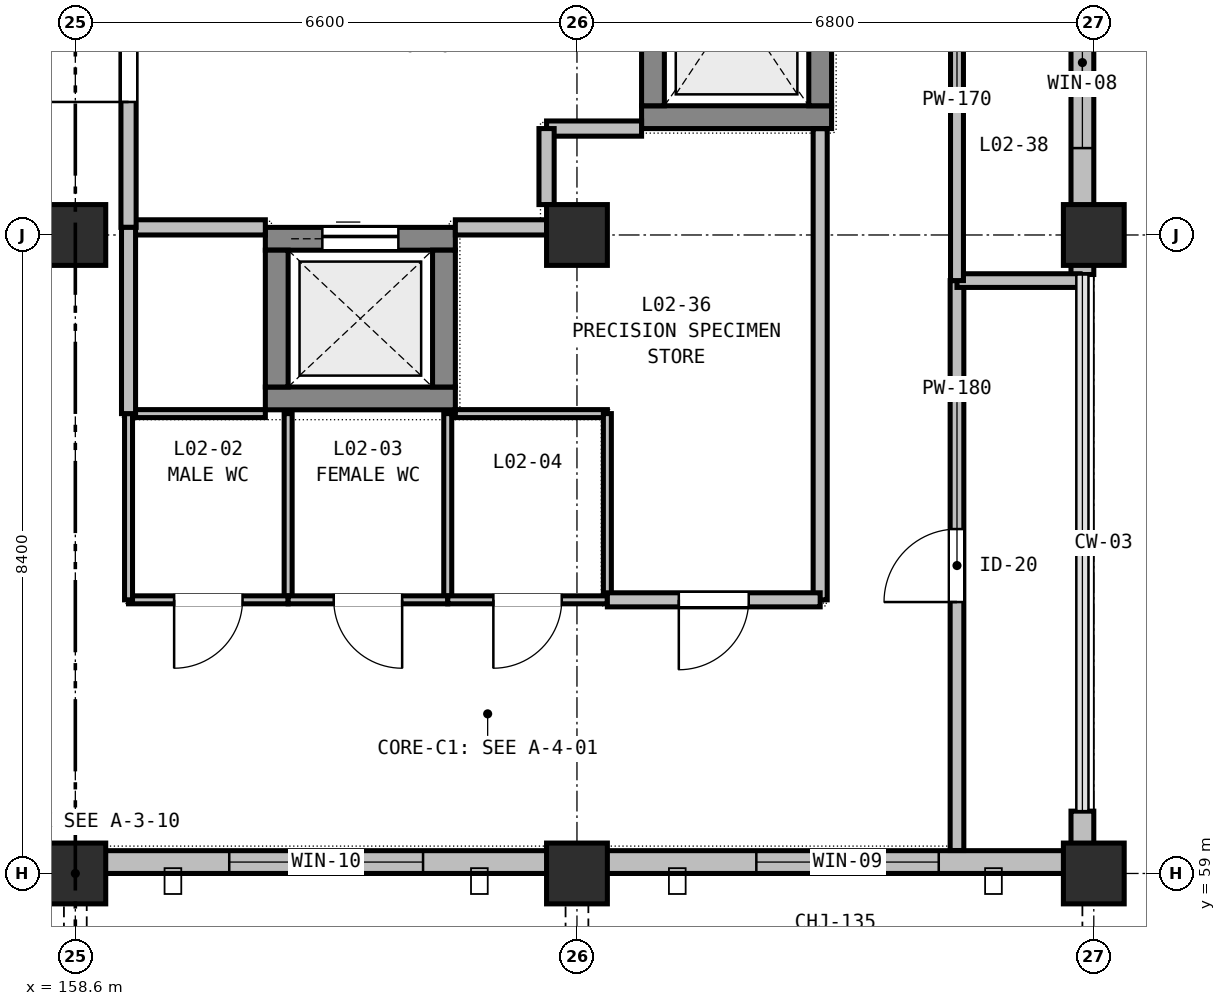
"""IFC4 building model, lengths in metres.
Left out: names, types, materials, properties, quantities, classifications, styles, units other than length and angle.
Written with IfcOpenShell. Run it as: python <this file> out.ifc"""

import sys

from ifc_helpers import new_model, si_unit, direction, frame, frame_2d, origin, origin_2d, place, context, subcontext, project, spatial, rectangle, extrude, element, fill, save


model = new_model("IFC4")
c1 = context("Model", 3, precision=1e-05, world=origin(), true_north=direction((0.0, 1.0)))
c2 = subcontext(c1, "Body", "Model", "MODEL_VIEW")
j1 = project(units=[si_unit("LENGTHUNIT", "METRE"), si_unit("PLANEANGLEUNIT", "RADIAN")], contexts=[c1])
p1 = place(None, origin())
s1 = spatial("IfcSite", under=j1, at=p1, CompositionType="ELEMENT")
p2 = place(p1, origin())
s2 = spatial("IfcBuilding", under=s1, at=p2, CompositionType="ELEMENT")
p3 = place(p2, frame((0.0, 0.0, 10.2)))
s3 = spatial("IfcBuildingStorey", under=s2, at=p3, CompositionType="ELEMENT", Elevation=10.2)
for number, where, z_axis, x_axis in (
    (1, (158.6, 59.0, 0.0), (0.0, 0.0, 1.0), (1.0, 0.0, 0.0)),
    (2, (158.6, 67.4, 0.0), (0.0, 0.0, 1.0), (1.0, 0.0, 0.0)),
    (3, (165.2, 59.0, 0.0), (0.0, 0.0, 1.0), (1.0, 0.0, 0.0)),
    (4, (165.2, 67.4, 0.0), (0.0, 0.0, 1.0), (1.0, 0.0, 0.0)),
    (5, (172.0, 59.0, 0.0), (0.0, 0.0, 1.0), (1.0, 0.0, 0.0)),
    (6, (172.0, 67.4, 0.0), (0.0, 0.0, 1.0), (1.0, 0.0, 0.0)),
):
    element("IfcColumn", number, at=place(p3, frame(where, z_axis=z_axis, x_axis=x_axis)), inside=s3, PredefinedType="COLUMN", context=c2, shape_type="SweptSolid", body=[
        extrude(rectangle(XDim=0.8, YDim=0.8, at=origin_2d()), origin(), (0.0, 0.0, 1.0), 4.8),
    ])
p4 = place(p3, frame((166.05, 68.95, 0.0), z_axis=(0.0, 0.0, 1.0), x_axis=(1.0, 0.0, 0.0)))
e7 = element("IfcWall", 7, at=p4, inside=s3, PredefinedType="SHEAR", context=c2, shape_type="SweptSolid", body=[
    extrude(rectangle(XDim=2.5, YDim=0.3, at=frame_2d((1.25, 0.0))), origin(), (0.0, 0.0, 1.0), 4.8),
])
p5 = place(p3, frame((166.2, 69.1, 0.0), z_axis=(0.0, 0.0, 1.0), x_axis=(0.0, 1.0, 0.0)))
e8 = element("IfcWall", 8, at=p5, inside=s3, PredefinedType="SHEAR", context=c2, shape_type="SweptSolid", body=[
    extrude(rectangle(XDim=2.7, YDim=0.3, at=frame_2d((1.35, 0.0))), origin(), (0.0, 0.0, 1.0), 4.8),
])
p6 = place(p5, frame((0.8, 0.0, 0.0)))
e9 = element("IfcOpeningElement", 9, at=p6, cuts=e8, PredefinedType="OPENING", context=c2, shape_type="SweptSolid", body=[
    extrude(rectangle(XDim=1.1, YDim=2.1, at=frame_2d((0.55, 1.05))), frame((0.0, 0.16, 0.0), z_axis=(0.0, -1.0, 0.0), x_axis=(1.0, 0.0, 0.0)), (0.0, 0.0, 1.0), 0.32),
])
p7 = place(p3, frame((168.4, 69.1, 0.0), z_axis=(0.0, 0.0, 1.0), x_axis=(0.0, 1.0, 0.0)))
e10 = element("IfcWall", 10, at=p7, inside=s3, PredefinedType="SHEAR", context=c2, shape_type="SweptSolid", body=[
    extrude(rectangle(XDim=2.7, YDim=0.3, at=frame_2d((1.35, 0.0))), origin(), (0.0, 0.0, 1.0), 4.8),
])
p8 = place(p3, frame((161.1, 65.25, 0.0), z_axis=(0.0, 0.0, 1.0), x_axis=(1.0, 0.0, 0.0)))
e11 = element("IfcWall", 11, at=p8, inside=s3, PredefinedType="SHEAR", context=c2, shape_type="SweptSolid", body=[
    extrude(rectangle(XDim=2.5, YDim=0.3, at=frame_2d((1.25, 0.0))), origin(), (0.0, 0.0, 1.0), 4.8),
])
p9 = place(p3, frame((161.1, 67.35, 0.0), z_axis=(0.0, 0.0, 1.0), x_axis=(1.0, 0.0, 0.0)))
e12 = element("IfcWall", 12, at=p9, inside=s3, PredefinedType="SHEAR", context=c2, shape_type="SweptSolid", body=[
    extrude(rectangle(XDim=2.5, YDim=0.3, at=frame_2d((1.25, 0.0))), origin(), (0.0, 0.0, 1.0), 4.8),
])
p10 = place(p9, frame((0.75, 0.0, 0.0)))
e13 = element("IfcOpeningElement", 13, at=p10, cuts=e12, PredefinedType="OPENING", context=c2, shape_type="SweptSolid", body=[
    extrude(rectangle(XDim=1.0, YDim=2.1, at=frame_2d((0.5, 1.05))), frame((0.0, 0.16, 0.0), z_axis=(0.0, -1.0, 0.0), x_axis=(1.0, 0.0, 0.0)), (0.0, 0.0, 1.0), 0.32),
])
for number, where, z_axis, x_axis in (
    (14, (161.25, 65.4, 0.0), (0.0, 0.0, 1.0), (0.0, 1.0, 0.0)),
    (15, (163.45, 65.4, 0.0), (0.0, 0.0, 1.0), (0.0, 1.0, 0.0)),
):
    element("IfcWall", number, at=place(p3, frame(where, z_axis=z_axis, x_axis=x_axis)), inside=s3, PredefinedType="SHEAR", context=c2, shape_type="SweptSolid", body=[
        extrude(rectangle(XDim=1.8, YDim=0.3, at=frame_2d((0.9, 0.0))), origin(), (0.0, 0.0, 1.0), 4.8),
    ])
p11 = place(p3, frame((171.85, 75.8, 0.0), z_axis=(0.0, 0.0, 1.0), x_axis=(0.0, -1.0, 0.0)))
e16 = element("IfcWall", 16, at=p11, inside=s3, PredefinedType="STANDARD", context=c2, shape_type="SweptSolid", body=[
    extrude(rectangle(XDim=8.4, YDim=0.3, at=frame_2d((4.2, 0.0))), origin(), (0.0, 0.0, 1.0), 4.085),
])
p12 = place(p11, frame((1.143, 0.0, 0.9)))
e17 = element("IfcOpeningElement", 17, at=p12, cuts=e16, PredefinedType="OPENING", context=c2, shape_type="SweptSolid", body=[
    extrude(rectangle(XDim=2.25, YDim=2.1, at=frame_2d((1.125, 1.05))), frame((0.0, 0.16, 0.0), z_axis=(0.0, -1.0, 0.0), x_axis=(1.0, 0.0, 0.0)), (0.0, 0.0, 1.0), 0.32),
])
p13 = place(p11, frame((5.007, 0.0, 0.9)))
e18 = element("IfcOpeningElement", 18, at=p13, cuts=e16, PredefinedType="OPENING", context=c2, shape_type="SweptSolid", body=[
    extrude(rectangle(XDim=2.25, YDim=2.1, at=frame_2d((1.125, 1.05))), frame((0.0, 0.16, 0.0), z_axis=(0.0, -1.0, 0.0), x_axis=(1.0, 0.0, 0.0)), (0.0, 0.0, 1.0), 0.32),
])
for number, where, z_axis, x_axis in (
    (19, (171.85, 67.4, 0.0), (0.0, 0.0, 1.0), (0.0, -1.0, 0.0)),
    (20, (171.85, 59.82, 0.0), (0.0, 0.0, 1.0), (0.0, -1.0, 0.0)),
):
    element("IfcWall", number, at=place(p3, frame(where, z_axis=z_axis, x_axis=x_axis)), inside=s3, PredefinedType="STANDARD", context=c2, shape_type="SweptSolid", body=[
        extrude(rectangle(XDim=0.52, YDim=0.3, at=frame_2d((0.26, 0.0))), origin(), (0.0, 0.0, 1.0), 4.085),
    ])
p14 = place(p3, frame((172.0, 59.15, 0.0), z_axis=(0.0, 0.0, 1.0), x_axis=(-1.0, 0.0, 0.0)))
e21 = element("IfcWall", 21, at=p14, inside=s3, PredefinedType="STANDARD", context=c2, shape_type="SweptSolid", body=[
    extrude(rectangle(XDim=6.8, YDim=0.3, at=frame_2d((3.4, 0.0))), origin(), (0.0, 0.0, 1.0), 3.935),
])
p15 = place(p14, frame((2.04, 0.0, 0.9)))
e22 = element("IfcOpeningElement", 22, at=p15, cuts=e21, PredefinedType="OPENING", context=c2, shape_type="SweptSolid", body=[
    extrude(rectangle(XDim=2.4, YDim=2.1, at=frame_2d((1.2, 1.05))), frame((0.0, 0.16, 0.0), z_axis=(0.0, -1.0, 0.0), x_axis=(1.0, 0.0, 0.0)), (0.0, 0.0, 1.0), 0.32),
])
p16 = place(p3, frame((165.2, 59.15, 0.0), z_axis=(0.0, 0.0, 1.0), x_axis=(-1.0, 0.0, 0.0)))
e23 = element("IfcWall", 23, at=p16, inside=s3, PredefinedType="STANDARD", context=c2, shape_type="SweptSolid", body=[
    extrude(rectangle(XDim=6.6, YDim=0.3, at=frame_2d((3.3, 0.0))), origin(), (0.0, 0.0, 1.0), 3.935),
])
p17 = place(p16, frame((2.025, 0.0, 0.75)))
e24 = element("IfcOpeningElement", 24, at=p17, cuts=e23, PredefinedType="OPENING", context=c2, shape_type="SweptSolid", body=[
    extrude(rectangle(XDim=2.55, YDim=2.15, at=frame_2d((1.275, 1.075))), frame((0.0, 0.16, 0.0), z_axis=(0.0, -1.0, 0.0), x_axis=(1.0, 0.0, 0.0)), (0.0, 0.0, 1.0), 0.32),
])
p18 = place(p3, frame((158.6, 59.15, 0.0), z_axis=(0.0, 0.0, 1.0), x_axis=(-1.0, 0.0, 0.0)))
e25 = element("IfcWall", 25, at=p18, inside=s3, PredefinedType="STANDARD", context=c2, shape_type="SweptSolid", body=[
    extrude(rectangle(XDim=6.6, YDim=0.3, at=frame_2d((3.3, 0.0))), origin(), (0.0, 0.0, 1.0), 3.935),
])
p19 = place(p18, frame((1.95, 0.0, 0.75)))
e26 = element("IfcOpeningElement", 26, at=p19, cuts=e25, PredefinedType="OPENING", context=c2, shape_type="SweptSolid", body=[
    extrude(rectangle(XDim=2.7, YDim=2.2, at=frame_2d((1.35, 1.1))), frame((0.0, 0.16, 0.0), z_axis=(0.0, -1.0, 0.0), x_axis=(1.0, 0.0, 0.0)), (0.0, 0.0, 1.0), 0.32),
])
p20 = place(p3, frame((166.05, 68.8, 0.0), z_axis=(0.0, 0.0, 1.0), x_axis=(-1.0, 0.0, 0.0)))
e27 = element("IfcWall", 27, at=p20, inside=s3, PredefinedType="PARTITIONING", context=c2, shape_type="SweptSolid", body=[
    extrude(rectangle(XDim=1.25, YDim=0.2, at=frame_2d((0.625, 0.0))), origin(), (0.0, 0.0, 1.0), 3.935),
])
p21 = place(p3, frame((164.8, 68.8, 0.0), z_axis=(0.0, 0.0, 1.0), x_axis=(0.0, -1.0, 0.0)))
e28 = element("IfcWall", 28, at=p21, inside=s3, PredefinedType="PARTITIONING", context=c2, shape_type="SweptSolid", body=[
    extrude(rectangle(XDim=1.0, YDim=0.2, at=frame_2d((0.5, 0.0))), origin(), (0.0, 0.0, 1.0), 4.495),
])
p22 = place(p3, frame((164.8, 67.5, 0.0), z_axis=(0.0, 0.0, 1.0), x_axis=(-1.0, 0.0, 0.0)))
e29 = element("IfcWall", 29, at=p22, inside=s3, PredefinedType="PARTITIONING", context=c2, shape_type="SweptSolid", body=[
    extrude(rectangle(XDim=1.2, YDim=0.2, at=frame_2d((0.6, 0.0))), origin(), (0.0, 0.0, 1.0), 4.135),
])
p23 = place(p3, frame((161.1, 67.5, 0.0), z_axis=(0.0, 0.0, 1.0), x_axis=(-1.0, 0.0, 0.0)))
e30 = element("IfcWall", 30, at=p23, inside=s3, PredefinedType="PARTITIONING", context=c2, shape_type="SweptSolid", body=[
    extrude(rectangle(XDim=1.8, YDim=0.2, at=frame_2d((0.9, 0.0))), origin(), (0.0, 0.0, 1.0), 4.135),
])
p24 = place(p3, frame((159.3, 67.5, 0.0), z_axis=(0.0, 0.0, 1.0), x_axis=(0.0, 1.0, 0.0)))
e31 = element("IfcWall", 31, at=p24, inside=s3, PredefinedType="PARTITIONING", context=c2, shape_type="SweptSolid", body=[
    extrude(rectangle(XDim=4.55, YDim=0.2, at=frame_2d((2.275, 0.0))), origin(), (0.0, 0.0, 1.0), 4.135),
])
p25 = place(p24, frame((1.65, 0.0, 0.0)))
e32 = element("IfcOpeningElement", 32, at=p25, cuts=e31, PredefinedType="OPENING", context=c2, shape_type="SweptSolid", body=[
    extrude(rectangle(XDim=1.25, YDim=2.15, at=frame_2d((0.625, 1.075))), frame((0.0, 0.11, 0.0), z_axis=(0.0, -1.0, 0.0), x_axis=(1.0, 0.0, 0.0)), (0.0, 0.0, 1.0), 0.22),
])
p26 = place(p3, frame((159.3, 65.05, 0.0), z_axis=(0.0, 0.0, 1.0), x_axis=(1.0, 0.0, 0.0)))
e33 = element("IfcWall", 33, at=p26, inside=s3, PredefinedType="PARTITIONING", context=c2, shape_type="SweptSolid", body=[
    extrude(rectangle(XDim=1.8, YDim=0.105, at=frame_2d((0.9, 0.0))), origin(), (0.0, 0.0, 1.0), 4.495),
])
p27 = place(p3, frame((161.4, 65.05, 0.0), z_axis=(0.0, 0.0, 1.0), x_axis=(0.0, -1.0, 0.0)))
e34 = element("IfcWall", 34, at=p27, inside=s3, PredefinedType="PARTITIONING", context=c2, shape_type="SweptSolid", body=[
    extrude(rectangle(XDim=2.45, YDim=0.105, at=frame_2d((1.225, 0.0))), origin(), (0.0, 0.0, 1.0), 4.495),
])
p28 = place(p3, frame((161.4, 62.6, 0.0), z_axis=(0.0, 0.0, 1.0), x_axis=(-1.0, 0.0, 0.0)))
e35 = element("IfcWall", 35, at=p28, inside=s3, PredefinedType="PARTITIONING", context=c2, shape_type="SweptSolid", body=[
    extrude(rectangle(XDim=2.1, YDim=0.105, at=frame_2d((1.05, 0.0))), origin(), (0.0, 0.0, 1.0), 4.495),
])
p29 = place(p28, frame((0.6, 0.0, 0.0)))
e36 = element("IfcOpeningElement", 36, at=p29, cuts=e35, PredefinedType="OPENING", context=c2, shape_type="SweptSolid", body=[
    extrude(rectangle(XDim=0.9, YDim=2.02, at=frame_2d((0.45, 1.01))), frame((0.0, 0.062, 0.0), z_axis=(0.0, -1.0, 0.0), x_axis=(1.0, 0.0, 0.0)), (0.0, 0.0, 1.0), 0.125),
])
for number, where, z_axis, x_axis in (
    (37, (159.3, 62.6, 0.0), (0.0, 0.0, 1.0), (0.0, 1.0, 0.0)),
    (38, (163.5, 65.05, 0.0), (0.0, 0.0, 1.0), (0.0, -1.0, 0.0)),
):
    element("IfcWall", number, at=place(p3, frame(where, z_axis=z_axis, x_axis=x_axis)), inside=s3, PredefinedType="PARTITIONING", context=c2, shape_type="SweptSolid", body=[
        extrude(rectangle(XDim=2.45, YDim=0.105, at=frame_2d((1.225, 0.0))), origin(), (0.0, 0.0, 1.0), 4.495),
    ])
p30 = place(p3, frame((163.5, 62.6, 0.0), z_axis=(0.0, 0.0, 1.0), x_axis=(-1.0, 0.0, 0.0)))
e39 = element("IfcWall", 39, at=p30, inside=s3, PredefinedType="PARTITIONING", context=c2, shape_type="SweptSolid", body=[
    extrude(rectangle(XDim=2.1, YDim=0.105, at=frame_2d((1.05, 0.0))), origin(), (0.0, 0.0, 1.0), 4.495),
])
p31 = place(p30, frame((0.6, 0.0, 0.0)))
e40 = element("IfcOpeningElement", 40, at=p31, cuts=e39, PredefinedType="OPENING", context=c2, shape_type="SweptSolid", body=[
    extrude(rectangle(XDim=0.9, YDim=2.02, at=frame_2d((0.45, 1.01))), frame((0.0, 0.062, 0.0), z_axis=(0.0, -1.0, 0.0), x_axis=(1.0, 0.0, 0.0)), (0.0, 0.0, 1.0), 0.125),
])
p32 = place(p3, frame((163.6, 65.05, 0.0), z_axis=(0.0, 0.0, 1.0), x_axis=(1.0, 0.0, 0.0)))
e41 = element("IfcWall", 41, at=p32, inside=s3, PredefinedType="PARTITIONING", context=c2, shape_type="SweptSolid", body=[
    extrude(rectangle(XDim=2.0, YDim=0.105, at=frame_2d((1.0, 0.0))), origin(), (0.0, 0.0, 1.0), 3.935),
])
p33 = place(p3, frame((165.6, 65.05, 0.0), z_axis=(0.0, 0.0, 1.0), x_axis=(0.0, -1.0, 0.0)))
e42 = element("IfcWall", 42, at=p33, inside=s3, PredefinedType="PARTITIONING", context=c2, shape_type="SweptSolid", body=[
    extrude(rectangle(XDim=2.45, YDim=0.105, at=frame_2d((1.225, 0.0))), origin(), (0.0, 0.0, 1.0), 4.495),
])
p34 = place(p3, frame((165.6, 62.6, 0.0), z_axis=(0.0, 0.0, 1.0), x_axis=(-1.0, 0.0, 0.0)))
e43 = element("IfcWall", 43, at=p34, inside=s3, PredefinedType="PARTITIONING", context=c2, shape_type="SweptSolid", body=[
    extrude(rectangle(XDim=2.1, YDim=0.105, at=frame_2d((1.05, 0.0))), origin(), (0.0, 0.0, 1.0), 3.935),
])
p35 = place(p34, frame((0.6, 0.0, 0.0)))
e44 = element("IfcOpeningElement", 44, at=p35, cuts=e43, PredefinedType="OPENING", context=c2, shape_type="SweptSolid", body=[
    extrude(rectangle(XDim=0.9, YDim=2.02, at=frame_2d((0.45, 1.01))), frame((0.0, 0.062, 0.0), z_axis=(0.0, -1.0, 0.0), x_axis=(1.0, 0.0, 0.0)), (0.0, 0.0, 1.0), 0.125),
])
p36 = place(p3, frame((168.4, 68.798, 0.0), z_axis=(0.0, 0.0, 1.0), x_axis=(0.0, -1.0, 0.0)))
e45 = element("IfcWall", 45, at=p36, inside=s3, PredefinedType="PARTITIONING", context=c2, shape_type="SweptSolid", body=[
    extrude(rectangle(XDim=6.198, YDim=0.185, at=frame_2d((3.099, 0.0))), origin(), (0.0, 0.0, 1.0), 4.135),
])
p37 = place(p3, frame((168.4, 62.6, 0.0), z_axis=(0.0, 0.0, 1.0), x_axis=(-1.0, 0.0, 0.0)))
e46 = element("IfcWall", 46, at=p37, inside=s3, PredefinedType="PARTITIONING", context=c2, shape_type="SweptSolid", body=[
    extrude(rectangle(XDim=2.8, YDim=0.185, at=frame_2d((1.4, 0.0))), origin(), (0.0, 0.0, 1.0), 4.285),
])
p38 = place(p37, frame((0.94, 0.0, 0.0)))
e47 = element("IfcOpeningElement", 47, at=p38, cuts=e46, PredefinedType="OPENING", context=c2, shape_type="SweptSolid", body=[
    extrude(rectangle(XDim=0.92, YDim=2.14, at=frame_2d((0.46, 1.07))), frame((0.0, 0.103, 0.0), z_axis=(0.0, -1.0, 0.0), x_axis=(1.0, 0.0, 0.0)), (0.0, 0.0, 1.0), 0.205),
])
p39 = place(p3, frame((159.3, 65.05, 0.0), z_axis=(0.0, 0.0, 1.0), x_axis=(0.0, 1.0, 0.0)))
e48 = element("IfcWall", 48, at=p39, inside=s3, PredefinedType="PARTITIONING", context=c2, shape_type="SweptSolid", body=[
    extrude(rectangle(XDim=2.45, YDim=0.185, at=frame_2d((1.225, 0.0))), origin(), (0.0, 0.0, 1.0), 4.135),
])
p40 = place(p3, frame((170.2, 59.302, 0.0), z_axis=(0.0, 0.0, 1.0), x_axis=(0.0, 1.0, 0.0)))
e49 = element("IfcWall", 49, at=p40, inside=s3, PredefinedType="PARTITIONING", context=c2, shape_type="SweptSolid", body=[
    extrude(rectangle(XDim=7.498, YDim=0.18, at=frame_2d((3.749, 0.0))), origin(), (0.0, 0.0, 1.0), 4.085),
])
p41 = place(p40, frame((3.269, 0.0, 0.0)))
e50 = element("IfcOpeningElement", 50, at=p41, cuts=e49, PredefinedType="OPENING", context=c2, shape_type="SweptSolid", body=[
    extrude(rectangle(XDim=0.96, YDim=2.14, at=frame_2d((0.48, 1.07))), frame((0.0, 0.1, 0.0), z_axis=(0.0, -1.0, 0.0), x_axis=(1.0, 0.0, 0.0)), (0.0, 0.0, 1.0), 0.2),
])
p42 = place(p3, frame((170.2, 66.8, 0.0), z_axis=(0.0, 0.0, 1.0), x_axis=(1.0, 0.0, 0.0)))
e51 = element("IfcWall", 51, at=p42, inside=s3, PredefinedType="PARTITIONING", context=c2, shape_type="SweptSolid", body=[
    extrude(rectangle(XDim=1.62, YDim=0.18, at=frame_2d((0.81, 0.0))), origin(), (0.0, 0.0, 1.0), 4.085),
])
p43 = place(p3, frame((170.2, 66.8, 0.0), z_axis=(0.0, 0.0, 1.0), x_axis=(0.0, 1.0, 0.0)))
e52 = element("IfcWall", 52, at=p43, inside=s3, PredefinedType="PARTITIONING", context=c2, shape_type="SweptSolid", body=[
    extrude(rectangle(XDim=9.4, YDim=0.17, at=frame_2d((4.7, 0.0))), origin(), (0.0, 0.0, 1.0), 4.135),
])
p44 = place(p43, frame((4.195, 0.0, 0.0)))
e53 = element("IfcOpeningElement", 53, at=p44, cuts=e52, PredefinedType="OPENING", context=c2, shape_type="SweptSolid", body=[
    extrude(rectangle(XDim=1.01, YDim=2.14, at=frame_2d((0.505, 1.07))), frame((0.0, 0.095, 0.0), z_axis=(0.0, -1.0, 0.0), x_axis=(1.0, 0.0, 0.0)), (0.0, 0.0, 1.0), 0.19),
])
p45 = place(p13, origin())
e54 = element("IfcWindow", 54, at=p45, inside=s3, PartitioningType="SINGLE_PANEL", PredefinedType="WINDOW", context=c2, shape_type="SweptSolid", body=[
    extrude(rectangle(XDim=2.25, YDim=2.1, at=frame_2d((1.125, 1.05))), frame((0.0, 0.03, 0.0), z_axis=(0.0, -1.0, 0.0), x_axis=(1.0, 0.0, 0.0)), (0.0, 0.0, 1.0), 0.06),
])
fill(e18, e54)
p46 = place(p15, origin())
e55 = element("IfcWindow", 55, at=p46, inside=s3, PartitioningType="SINGLE_PANEL", PredefinedType="WINDOW", context=c2, shape_type="SweptSolid", body=[
    extrude(rectangle(XDim=2.4, YDim=2.1, at=frame_2d((1.2, 1.05))), frame((0.0, 0.03, 0.0), z_axis=(0.0, -1.0, 0.0), x_axis=(1.0, 0.0, 0.0)), (0.0, 0.0, 1.0), 0.06),
])
fill(e22, e55)
p47 = place(p17, origin())
e56 = element("IfcWindow", 56, at=p47, inside=s3, PartitioningType="SINGLE_PANEL", PredefinedType="WINDOW", context=c2, shape_type="SweptSolid", body=[
    extrude(rectangle(XDim=2.55, YDim=2.15, at=frame_2d((1.275, 1.075))), frame((0.0, 0.03, 0.0), z_axis=(0.0, -1.0, 0.0), x_axis=(1.0, 0.0, 0.0)), (0.0, 0.0, 1.0), 0.06),
])
fill(e24, e56)
p48 = place(p10, origin())
e57 = element("IfcDoor", 57, at=p48, inside=s3, OperationType="SLIDING_TO_LEFT", PredefinedType="DOOR", context=c2, shape_type="SweptSolid", body=[
    extrude(rectangle(XDim=1.0, YDim=2.1, at=frame_2d((0.5, 1.05))), frame((0.0, 0.025, 0.0), z_axis=(0.0, -1.0, 0.0), x_axis=(1.0, 0.0, 0.0)), (0.0, 0.0, 1.0), 0.05),
])
fill(e13, e57)
p49 = place(p25, origin())
e58 = element("IfcDoor", 58, at=p49, inside=s3, OperationType="SINGLE_SWING_LEFT", PredefinedType="DOOR", context=c2, shape_type="SweptSolid", body=[
    extrude(rectangle(XDim=1.25, YDim=2.15, at=frame_2d((0.625, 1.075))), frame((0.0, 0.025, 0.0), z_axis=(0.0, -1.0, 0.0), x_axis=(1.0, 0.0, 0.0)), (0.0, 0.0, 1.0), 0.05),
])
fill(e32, e58)
p50 = place(p29, origin())
e59 = element("IfcDoor", 59, at=p50, inside=s3, OperationType="SINGLE_SWING_RIGHT", PredefinedType="DOOR", context=c2, shape_type="SweptSolid", body=[
    extrude(rectangle(XDim=0.9, YDim=2.02, at=frame_2d((0.45, 1.01))), frame((0.0, 0.025, 0.0), z_axis=(0.0, -1.0, 0.0), x_axis=(1.0, 0.0, 0.0)), (0.0, 0.0, 1.0), 0.05),
])
fill(e36, e59)
p51 = place(p31, origin())
e60 = element("IfcDoor", 60, at=p51, inside=s3, OperationType="SINGLE_SWING_LEFT", PredefinedType="DOOR", context=c2, shape_type="SweptSolid", body=[
    extrude(rectangle(XDim=0.9, YDim=2.02, at=frame_2d((0.45, 1.01))), frame((0.0, 0.025, 0.0), z_axis=(0.0, -1.0, 0.0), x_axis=(1.0, 0.0, 0.0)), (0.0, 0.0, 1.0), 0.05),
])
fill(e40, e60)
p52 = place(p35, origin())
e61 = element("IfcDoor", 61, at=p52, inside=s3, OperationType="SINGLE_SWING_RIGHT", PredefinedType="DOOR", context=c2, shape_type="SweptSolid", body=[
    extrude(rectangle(XDim=0.9, YDim=2.02, at=frame_2d((0.45, 1.01))), frame((0.0, 0.025, 0.0), z_axis=(0.0, -1.0, 0.0), x_axis=(1.0, 0.0, 0.0)), (0.0, 0.0, 1.0), 0.05),
])
fill(e44, e61)
p53 = place(p38, origin())
e62 = element("IfcDoor", 62, at=p53, inside=s3, OperationType="SINGLE_SWING_RIGHT", PredefinedType="DOOR", context=c2, shape_type="SweptSolid", body=[
    extrude(rectangle(XDim=0.92, YDim=2.14, at=frame_2d((0.46, 1.07))), frame((0.0, 0.025, 0.0), z_axis=(0.0, -1.0, 0.0), x_axis=(1.0, 0.0, 0.0)), (0.0, 0.0, 1.0), 0.05),
])
fill(e47, e62)
p54 = place(p41, origin())
e63 = element("IfcDoor", 63, at=p54, inside=s3, OperationType="SINGLE_SWING_LEFT", PredefinedType="DOOR", context=c2, shape_type="SweptSolid", body=[
    extrude(rectangle(XDim=0.96, YDim=2.14, at=frame_2d((0.48, 1.07))), frame((0.0, 0.025, 0.0), z_axis=(0.0, -1.0, 0.0), x_axis=(1.0, 0.0, 0.0)), (0.0, 0.0, 1.0), 0.05),
])
fill(e50, e63)
save(model, sys.argv[1])
